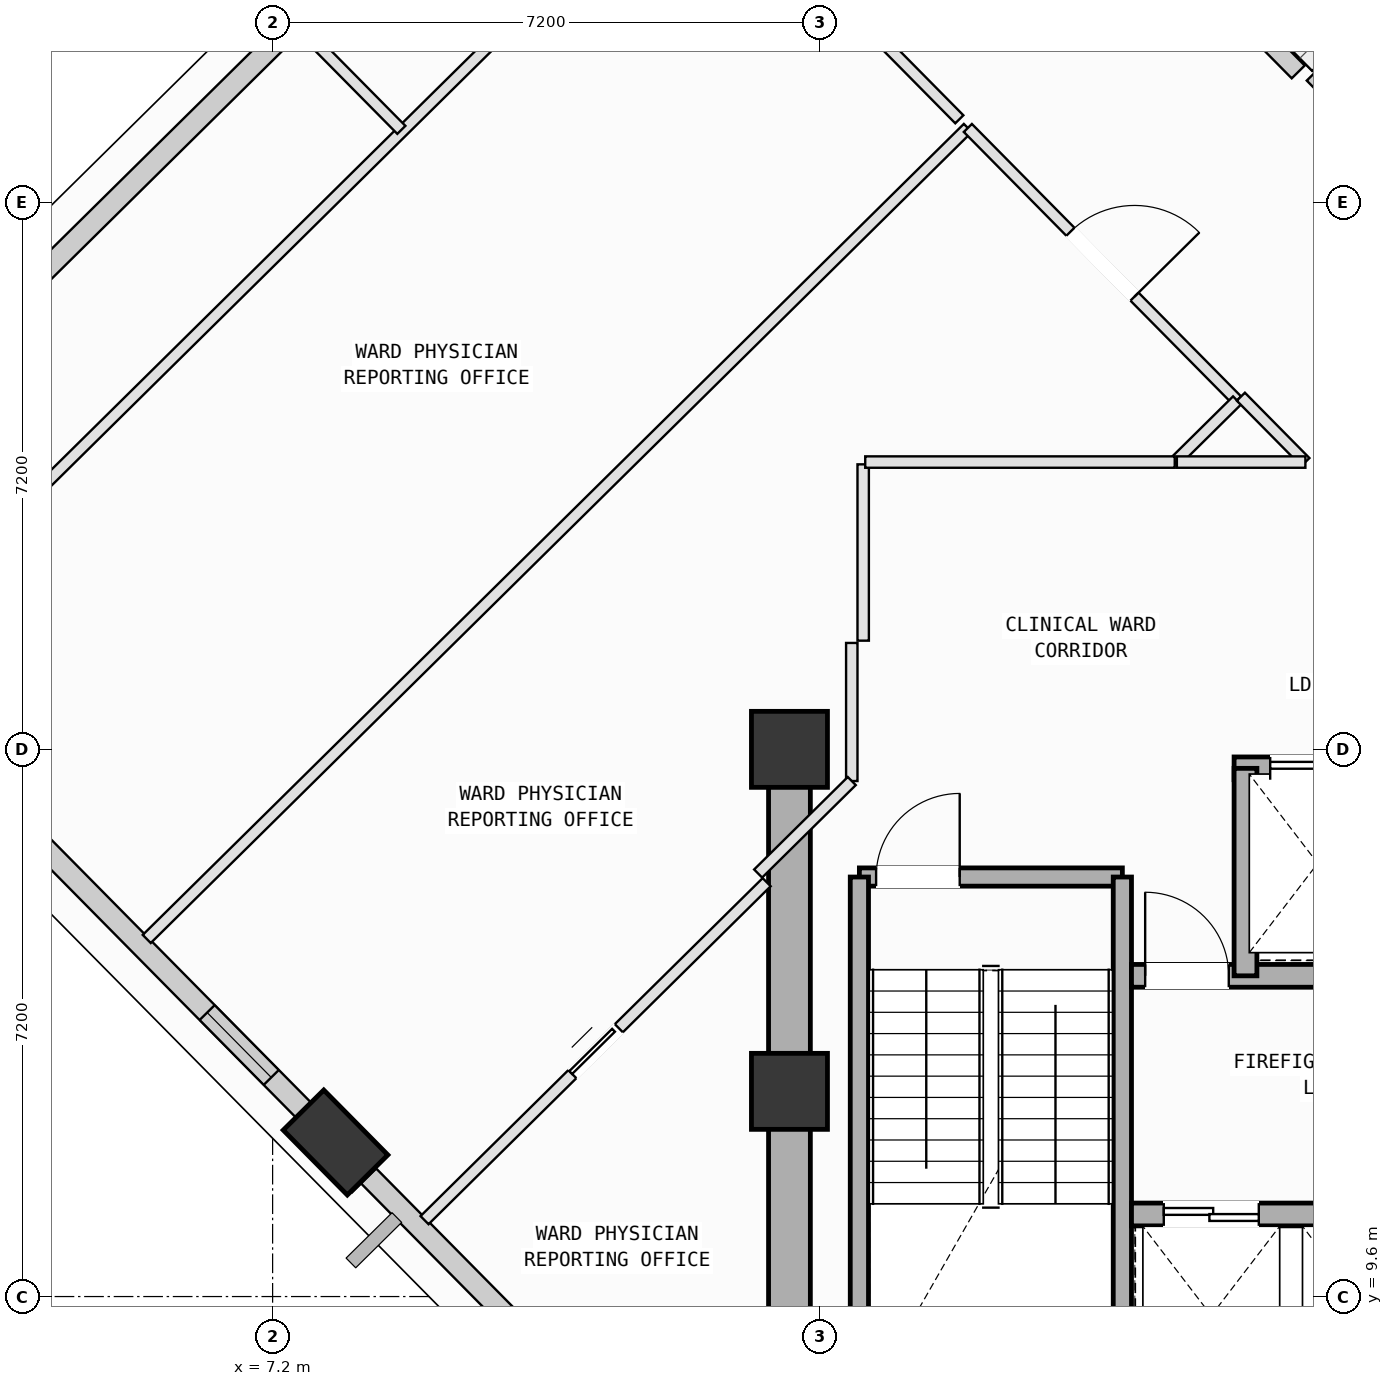
"""IFC4 building model, lengths in metres.
Left out: names, types, materials, properties, quantities, classifications, styles, units other than length and angle.
Written with IfcOpenShell. Run it as: python <this file> out.ifc"""

import sys

from ifc_helpers import new_model, si_unit, direction, frame, frame_2d, origin, origin_2d, place, context, subcontext, project, spatial, rectangle, extrude, element, fill, save


model = new_model("IFC4")
c1 = context("Model", 3, precision=1e-05, world=origin(), true_north=direction((0.0, 1.0)))
c2 = subcontext(c1, "Body", "Model", "MODEL_VIEW")
j1 = project(units=[si_unit("LENGTHUNIT", "METRE"), si_unit("PLANEANGLEUNIT", "RADIAN")], contexts=[c1])
p1 = place(None, origin())
s1 = spatial("IfcSite", under=j1, at=p1, CompositionType="ELEMENT")
p2 = place(p1, origin())
s2 = spatial("IfcBuilding", under=s1, at=p2, CompositionType="ELEMENT")
p3 = place(p2, frame((0.0, 0.0, 215.2)))
s3 = spatial("IfcBuildingStorey", under=s2, at=p3, CompositionType="ELEMENT", Elevation=215.2)
for number, where, z_axis, x_axis in (
    (1, (14.0, 12.3, 0.0), (0.0, 0.0, 1.0), (1.0, 0.0, 0.0)),
    (2, (14.0, 16.8, 0.0), (0.0, 0.0, 1.0), (1.0, 0.0, 0.0)),
):
    element("IfcColumn", number, at=place(p3, frame(where, z_axis=z_axis, x_axis=x_axis)), inside=s3, PredefinedType="COLUMN", context=c2, shape_type="SweptSolid", body=[
        extrude(rectangle(XDim=1.0, YDim=1.0, at=origin_2d()), origin(), (0.0, 0.0, 1.0), 4.0),
    ])
p4 = place(p3, frame((8.028, 11.627, 0.002), z_axis=(0.055080788667, -0.104762689458, 0.992970737543), x_axis=(-0.950778623185, 0.298211129608, 0.084202920807)))
e3 = element("IfcColumn", 3, at=p4, inside=s3, PredefinedType="COLUMN", context=c2, shape_type="SweptSolid", body=[
    extrude(rectangle(XDim=1.2, YDim=0.75, at=origin_2d()), origin(), (0.0, 0.0, 1.0), 4.025),
])
p5 = place(p3, frame((15.802, 30.665, 0.0), z_axis=(0.0, 0.0, 1.0), x_axis=(0.702761539953, -0.711425483071, 0.0)))
e4 = element("IfcWall", 4, at=p5, inside=s3, PredefinedType="SOLIDWALL", context=c2, shape_type="SweptSolid", body=[
    extrude(rectangle(XDim=6.96, YDim=0.24, at=frame_2d((3.48, 0.0))), origin(), (0.0, 0.0, 1.0), 3.265),
])
p6 = place(p5, frame((1.151, 0.0, 0.0)))
e5 = element("IfcOpeningElement", 5, at=p6, cuts=e4, PredefinedType="OPENING", context=c2, shape_type="SweptSolid", body=[
    extrude(rectangle(XDim=1.1, YDim=2.15, at=frame_2d((0.55, 1.075))), frame((0.0, 0.13, 0.0), z_axis=(0.0, -1.0, 0.0), x_axis=(1.0, 0.0, 0.0)), (0.0, 0.0, 1.0), 0.26),
])
p7 = place(p3, frame((20.89, 25.514, 0.0), z_axis=(0.0, 0.0, 1.0), x_axis=(0.71139038819, 0.702797065725, 0.0)))
e6 = element("IfcWall", 6, at=p7, inside=s3, PredefinedType="SOLIDWALL", context=c2, shape_type="SweptSolid", body=[
    extrude(rectangle(XDim=2.5, YDim=0.24, at=frame_2d((1.25, 0.0))), origin(), (0.0, 0.0, 1.0), 3.265),
])
p8 = place(p3, frame((2.666, 21.582, 0.0), z_axis=(0.0, 0.0, 1.0), x_axis=(0.711415560766, 0.702771584443, 0.0)))
e7 = element("IfcWall", 7, at=p8, inside=s3, PredefinedType="SOLIDWALL", context=c2, shape_type="SweptSolid", body=[
    extrude(rectangle(XDim=7.485, YDim=0.28, at=frame_2d((3.742, 0.0))), origin(), (0.0, 0.0, 1.0), 3.265),
])
p9 = place(p3, frame((7.913, 11.743, 0.0), z_axis=(0.0, 0.0, 1.0), x_axis=(-0.702759613108, 0.711427386445, 0.0)))
e8 = element("IfcWall", 8, at=p9, inside=s3, PredefinedType="SOLIDWALL", context=c2, shape_type="SweptSolid", body=[
    extrude(rectangle(XDim=5.831, YDim=0.28, at=frame_2d((2.915, 0.0))), origin(), (0.0, 0.0, 1.0), 3.265),
])
p10 = place(p9, frame((1.04, 0.0, 0.75)))
e9 = element("IfcOpeningElement", 9, at=p10, cuts=e8, PredefinedType="OPENING", context=c2, shape_type="SweptSolid", body=[
    extrude(rectangle(XDim=1.2, YDim=1.75, at=frame_2d((0.6, 0.875))), frame((0.0, 0.15, 0.0), z_axis=(0.0, -1.0, 0.0), x_axis=(1.0, 0.0, 0.0)), (0.0, 0.0, 1.0), 0.3),
])
p11 = place(p3, frame((12.582, 7.017, 0.0), z_axis=(0.0, 0.0, 1.0), x_axis=(-0.702761134533, 0.711425883554, 0.0)))
e10 = element("IfcWall", 10, at=p11, inside=s3, PredefinedType="SOLIDWALL", context=c2, shape_type="SweptSolid", body=[
    extrude(rectangle(XDim=5.861, YDim=0.28, at=frame_2d((2.93, 0.0))), origin(), (0.0, 0.0, 1.0), 3.265),
])
p12 = place(p11, frame((1.56, 0.0, 0.75)))
e11 = element("IfcOpeningElement", 11, at=p12, cuts=e10, PredefinedType="OPENING", context=c2, shape_type="SweptSolid", body=[
    extrude(rectangle(XDim=1.6, YDim=1.95, at=frame_2d((0.8, 0.975))), frame((0.0, 0.15, 0.0), z_axis=(0.0, -1.0, 0.0), x_axis=(1.0, 0.0, 0.0)), (0.0, 0.0, 1.0), 0.3),
])
p13 = place(p3, frame((14.92, 15.12, 0.0), z_axis=(0.0, 0.0, 1.0), x_axis=(1.0, 0.0, 0.0)))
e12 = element("IfcWall", 12, at=p13, inside=s3, PredefinedType="SOLIDWALL", context=c2, shape_type="SweptSolid", body=[
    extrude(rectangle(XDim=3.46, YDim=0.24, at=frame_2d((1.73, 0.0))), origin(), (0.0, 0.0, 1.0), 3.78),
])
p14 = place(p13, frame((0.22, 0.0, 0.0)))
e13 = element("IfcOpeningElement", 13, at=p14, cuts=e12, PredefinedType="OPENING", context=c2, shape_type="SweptSolid", body=[
    extrude(rectangle(XDim=1.1, YDim=2.15, at=frame_2d((0.55, 1.075))), frame((0.0, 0.13, 0.0), z_axis=(0.0, -1.0, 0.0), x_axis=(1.0, 0.0, 0.0)), (0.0, 0.0, 1.0), 0.26),
])
for number, where, z_axis, x_axis in (
    (14, (18.38, 15.12, 0.0), (0.0, 0.0, 1.0), (0.0, -1.0, 0.0)),
    (15, (14.92, 8.075, 0.0), (0.0, 0.0, 1.0), (0.0, 1.0, 0.0)),
):
    element("IfcWall", number, at=place(p3, frame(where, z_axis=z_axis, x_axis=x_axis)), inside=s3, PredefinedType="SOLIDWALL", context=c2, shape_type="SweptSolid", body=[
        extrude(rectangle(XDim=7.045, YDim=0.24, at=frame_2d((3.522, 0.0))), origin(), (0.0, 0.0, 1.0), 3.78),
    ])
p15 = place(p3, frame((14.0, 16.8, 0.0), z_axis=(0.0, 0.0, 1.0), x_axis=(0.0, -1.0, 0.0)))
e16 = element("IfcWall", 16, at=p15, inside=s3, PredefinedType="SHEAR", context=c2, shape_type="SweptSolid", body=[
    extrude(rectangle(XDim=9.0, YDim=0.55, at=frame_2d((4.5, 0.0))), origin(), (0.0, 0.0, 1.0), 3.78),
])
p16 = place(p3, frame((19.85, 16.55, 0.0), z_axis=(0.0, 0.0, 1.0), x_axis=(1.0, 0.0, 0.0)))
e17 = element("IfcWall", 17, at=p16, inside=s3, PredefinedType="SOLIDWALL", context=c2, shape_type="SweptSolid", body=[
    extrude(rectangle(XDim=4.45, YDim=0.3, at=frame_2d((2.225, 0.0))), origin(), (0.0, 0.0, 1.0), 3.78),
])
p17 = place(p16, frame((0.475, 0.0, 0.0)))
e18 = element("IfcOpeningElement", 18, at=p17, cuts=e17, PredefinedType="OPENING", context=c2, shape_type="SweptSolid", body=[
    extrude(rectangle(XDim=1.25, YDim=2.18, at=frame_2d((0.625, 1.09))), frame((0.0, 0.16, 0.0), z_axis=(0.0, -1.0, 0.0), x_axis=(1.0, 0.0, 0.0)), (0.0, 0.0, 1.0), 0.32),
])
p18 = place(p16, frame((2.49, 0.0, 0.0)))
e19 = element("IfcOpeningElement", 19, at=p18, cuts=e17, PredefinedType="OPENING", context=c2, shape_type="SweptSolid", body=[
    extrude(rectangle(XDim=1.02, YDim=2.12, at=frame_2d((0.51, 1.06))), frame((0.0, 0.16, 0.0), z_axis=(0.0, -1.0, 0.0), x_axis=(1.0, 0.0, 0.0)), (0.0, 0.0, 1.0), 0.32),
])
p19 = place(p3, frame((18.5, 10.68, 0.0), z_axis=(0.0, 0.0, 1.0), x_axis=(1.0, 0.0, 0.0)))
e20 = element("IfcWall", 20, at=p19, inside=s3, PredefinedType="SOLIDWALL", context=c2, shape_type="SweptSolid", body=[
    extrude(rectangle(XDim=5.3, YDim=0.3, at=frame_2d((2.65, 0.0))), origin(), (0.0, 0.0, 1.0), 3.78),
])
p20 = place(p19, frame((4.22, 0.0, 0.0)))
e21 = element("IfcOpeningElement", 21, at=p20, cuts=e20, PredefinedType="OPENING", context=c2, shape_type="SweptSolid", body=[
    extrude(rectangle(XDim=0.86, YDim=2.06, at=frame_2d((0.43, 1.03))), frame((0.0, 0.16, 0.0), z_axis=(0.0, -1.0, 0.0), x_axis=(1.0, 0.0, 0.0)), (0.0, 0.0, 1.0), 0.32),
])
p21 = place(p19, frame((0.425, 0.0, 0.0)))
e22 = element("IfcOpeningElement", 22, at=p21, cuts=e20, PredefinedType="OPENING", context=c2, shape_type="SweptSolid", body=[
    extrude(rectangle(XDim=1.25, YDim=2.18, at=frame_2d((0.625, 1.09))), frame((0.0, 0.16, 0.0), z_axis=(0.0, -1.0, 0.0), x_axis=(1.0, 0.0, 0.0)), (0.0, 0.0, 1.0), 0.32),
])
p22 = place(p19, frame((2.525, 0.0, 0.0)))
e23 = element("IfcOpeningElement", 23, at=p22, cuts=e20, PredefinedType="OPENING", context=c2, shape_type="SweptSolid", body=[
    extrude(rectangle(XDim=1.25, YDim=2.18, at=frame_2d((0.625, 1.09))), frame((0.0, 0.16, 0.0), z_axis=(0.0, -1.0, 0.0), x_axis=(1.0, 0.0, 0.0)), (0.0, 0.0, 1.0), 0.32),
])
p23 = place(p3, frame((18.5, 13.82, 0.0), z_axis=(0.0, 0.0, 1.0), x_axis=(1.0, 0.0, 0.0)))
e24 = element("IfcWall", 24, at=p23, inside=s3, PredefinedType="SOLIDWALL", context=c2, shape_type="SweptSolid", body=[
    extrude(rectangle(XDim=5.3, YDim=0.3, at=frame_2d((2.65, 0.0))), origin(), (0.0, 0.0, 1.0), 3.78),
])
p24 = place(p23, frame((0.18, 0.0, 0.0)))
e25 = element("IfcOpeningElement", 25, at=p24, cuts=e24, PredefinedType="OPENING", context=c2, shape_type="SweptSolid", body=[
    extrude(rectangle(XDim=1.1, YDim=2.15, at=frame_2d((0.55, 1.075))), frame((0.0, 0.16, 0.0), z_axis=(0.0, -1.0, 0.0), x_axis=(1.0, 0.0, 0.0)), (0.0, 0.0, 1.0), 0.32),
])
p25 = place(p3, frame((20.0, 13.82, 0.0), z_axis=(0.0, 0.0, 1.0), x_axis=(0.0, 1.0, 0.0)))
e26 = element("IfcWall", 26, at=p25, inside=s3, PredefinedType="SOLIDWALL", context=c2, shape_type="SweptSolid", body=[
    extrude(rectangle(XDim=2.73, YDim=0.3, at=frame_2d((1.365, 0.0))), origin(), (0.0, 0.0, 1.0), 3.78),
])
p26 = place(p3, frame((9.199, 10.605, 0.0), z_axis=(0.0, 0.0, 1.0), x_axis=(0.71135759635, 0.702830256971, 0.0)))
e27 = element("IfcWall", 27, at=p26, inside=s3, PredefinedType="PARTITIONING", context=c2, shape_type="SweptSolid", body=[
    extrude(rectangle(XDim=6.327, YDim=0.15, at=frame_2d((3.164, 0.0))), origin(), (0.0, 0.0, 1.0), 3.78),
])
p27 = place(p26, frame((2.734, 0.0, 0.0)))
e28 = element("IfcOpeningElement", 28, at=p27, cuts=e27, PredefinedType="OPENING", context=c2, shape_type="SweptSolid", body=[
    extrude(rectangle(XDim=0.86, YDim=2.06, at=frame_2d((0.43, 1.03))), frame((0.0, 0.085, 0.0), z_axis=(0.0, -1.0, 0.0), x_axis=(1.0, 0.0, 0.0)), (0.0, 0.0, 1.0), 0.17),
])
p28 = place(p3, frame((14.97, 20.55, 0.0), z_axis=(0.0, 0.0, 1.0), x_axis=(0.0, -1.0, 0.0)))
e29 = element("IfcWall", 29, at=p28, inside=s3, PredefinedType="PARTITIONING", context=c2, shape_type="SweptSolid", body=[
    extrude(rectangle(XDim=2.32, YDim=0.15, at=frame_2d((1.16, 0.0))), origin(), (0.0, 0.0, 1.0), 3.78),
])
p29 = place(p3, frame((14.82, 18.2, 0.0), z_axis=(0.0, 0.0, 1.0), x_axis=(0.0, -1.0, 0.0)))
e30 = element("IfcWall", 30, at=p29, inside=s3, PredefinedType="PARTITIONING", context=c2, shape_type="SweptSolid", body=[
    extrude(rectangle(XDim=1.817, YDim=0.15, at=frame_2d((0.908, 0.0))), origin(), (0.0, 0.0, 1.0), 3.78),
])
p30 = place(p3, frame((14.82, 16.383, 0.0), z_axis=(0.0, 0.0, 1.0), x_axis=(-0.711463271884, -0.702723283206, 0.0)))
e31 = element("IfcWall", 31, at=p30, inside=s3, PredefinedType="PARTITIONING", context=c2, shape_type="SweptSolid", body=[
    extrude(rectangle(XDim=1.732, YDim=0.15, at=frame_2d((0.866, 0.0))), origin(), (0.0, 0.0, 1.0), 3.78),
])
p31 = place(p3, frame((8.299, 11.024, 0.0), z_axis=(0.0, 0.0, 1.0), x_axis=(-0.702570675203, 0.711613972842, 0.0)))
e32 = element("IfcWall", 32, at=p31, inside=s3, PredefinedType="PARTITIONING", context=c2, shape_type="SweptSolid", body=[
    extrude(rectangle(XDim=0.783, YDim=0.15, at=frame_2d((0.392, 0.0))), origin(), (0.0, 0.0, 1.0), 3.265),
])
p32 = place(p3, frame((5.544, 14.305, 0.0), z_axis=(0.0, 0.0, 1.0), x_axis=(0.711434510245, 0.702752401371, 0.0)))
e33 = element("IfcWall", 33, at=p32, inside=s3, PredefinedType="PARTITIONING", context=c2, shape_type="SweptSolid", body=[
    extrude(rectangle(XDim=15.185, YDim=0.15, at=frame_2d((7.592, 0.0))), origin(), (0.0, 0.0, 1.0), 3.78),
])
p33 = place(p3, frame((16.347, 24.976, 0.0), z_axis=(0.0, 0.0, 1.0), x_axis=(0.702830826081, -0.711357034062, 0.0)))
e34 = element("IfcWall", 34, at=p33, inside=s3, PredefinedType="PARTITIONING", context=c2, shape_type="SweptSolid", body=[
    extrude(rectangle(XDim=5.04, YDim=0.15, at=frame_2d((2.52, 0.0))), origin(), (0.0, 0.0, 1.0), 3.78),
])
p34 = place(p33, frame((1.92, 0.0, 0.0)))
e35 = element("IfcOpeningElement", 35, at=p34, cuts=e34, PredefinedType="OPENING", context=c2, shape_type="SweptSolid", body=[
    extrude(rectangle(XDim=1.2, YDim=2.15, at=frame_2d((0.6, 1.075))), frame((0.0, 0.085, 0.0), z_axis=(0.0, -1.0, 0.0), x_axis=(1.0, 0.0, 0.0)), (0.0, 0.0, 1.0), 0.17),
])
p35 = place(p3, frame((19.889, 21.391, 0.0), z_axis=(0.0, 0.0, 1.0), x_axis=(-0.710907212679, -0.703285813138, 0.0)))
e36 = element("IfcWall", 36, at=p35, inside=s3, PredefinedType="PARTITIONING", context=c2, shape_type="SweptSolid", body=[
    extrude(rectangle(XDim=1.153, YDim=0.15, at=frame_2d((0.577, 0.0))), origin(), (0.0, 0.0, 1.0), 3.78),
])
p36 = place(p3, frame((19.069, 20.58, 0.0), z_axis=(0.0, 0.0, 1.0), x_axis=(-1.0, 0.0, 0.0)))
e37 = element("IfcWall", 37, at=p36, inside=s3, PredefinedType="PARTITIONING", context=c2, shape_type="SweptSolid", body=[
    extrude(rectangle(XDim=4.072, YDim=0.15, at=frame_2d((2.036, 0.0))), origin(), (0.0, 0.0, 1.0), 3.78),
])
p37 = place(p3, frame((3.038, 19.138, 0.0), z_axis=(0.0, 0.0, 1.0), x_axis=(0.71143794273, 0.702748926462, 0.0)))
e38 = element("IfcWall", 38, at=p37, inside=s3, PredefinedType="PARTITIONING", context=c2, shape_type="SweptSolid", body=[
    extrude(rectangle(XDim=13.571, YDim=0.15, at=frame_2d((6.786, 0.0))), origin(), (0.0, 0.0, 1.0), 3.78),
])
p38 = place(p3, frame((12.693, 28.675, 0.0), z_axis=(0.0, 0.0, 1.0), x_axis=(0.702830826081, -0.711357034062, 0.0)))
e39 = element("IfcWall", 39, at=p38, inside=s3, PredefinedType="PARTITIONING", context=c2, shape_type="SweptSolid", body=[
    extrude(rectangle(XDim=5.04, YDim=0.15, at=frame_2d((2.52, 0.0))), origin(), (0.0, 0.0, 1.0), 3.78),
])
p39 = place(p38, frame((1.92, 0.0, 0.0)))
e40 = element("IfcOpeningElement", 40, at=p39, cuts=e39, PredefinedType="OPENING", context=c2, shape_type="SweptSolid", body=[
    extrude(rectangle(XDim=1.2, YDim=2.15, at=frame_2d((0.6, 1.075))), frame((0.0, 0.085, 0.0), z_axis=(0.0, -1.0, 0.0), x_axis=(1.0, 0.0, 0.0)), (0.0, 0.0, 1.0), 0.17),
])
p40 = place(p3, frame((19.939, 21.44, 0.0), z_axis=(0.0, 0.0, 1.0), x_axis=(0.70264822924, -0.711537396028, 0.0)))
e41 = element("IfcWall", 41, at=p40, inside=s3, PredefinedType="PARTITIONING", context=c2, shape_type="SweptSolid", body=[
    extrude(rectangle(XDim=1.208, YDim=0.15, at=frame_2d((0.604, 0.0))), origin(), (0.0, 0.0, 1.0), 3.78),
])
p41 = place(p3, frame((20.788, 20.58, 0.0), z_axis=(0.0, 0.0, 1.0), x_axis=(-1.0, 0.0, 0.0)))
e42 = element("IfcWall", 42, at=p41, inside=s3, PredefinedType="PARTITIONING", context=c2, shape_type="SweptSolid", body=[
    extrude(rectangle(XDim=1.691, YDim=0.15, at=frame_2d((0.846, 0.0))), origin(), (0.0, 0.0, 1.0), 3.78),
])
p42 = place(p3, frame((8.894, 24.951, 0.0), z_axis=(0.0, 0.0, 1.0), x_axis=(-0.703036635776, 0.711153632316, 0.0)))
e43 = element("IfcWall", 43, at=p42, inside=s3, PredefinedType="PARTITIONING", context=c2, shape_type="SweptSolid", body=[
    extrude(rectangle(XDim=1.865, YDim=0.15, at=frame_2d((0.932, 0.0))), origin(), (0.0, 0.0, 1.0), 3.78),
])
p43 = place(p10, origin())
e44 = element("IfcWindow", 44, at=p43, inside=s3, PartitioningType="SINGLE_PANEL", PredefinedType="WINDOW", context=c2, shape_type="SweptSolid", body=[
    extrude(rectangle(XDim=1.2, YDim=1.75, at=frame_2d((0.6, 0.875))), frame((0.0, 0.03, 0.0), z_axis=(0.0, -1.0, 0.0), x_axis=(1.0, 0.0, 0.0)), (0.0, 0.0, 1.0), 0.06),
])
fill(e9, e44)
p44 = place(p14, origin())
e45 = element("IfcDoor", 45, at=p44, inside=s3, OperationType="SINGLE_SWING_RIGHT", PredefinedType="DOOR", context=c2, shape_type="SweptSolid", body=[
    extrude(rectangle(XDim=1.1, YDim=2.15, at=frame_2d((0.55, 1.075))), frame((0.0, 0.025, 0.0), z_axis=(0.0, -1.0, 0.0), x_axis=(1.0, 0.0, 0.0)), (0.0, 0.0, 1.0), 0.05),
])
fill(e13, e45)
p45 = place(p24, origin())
e46 = element("IfcDoor", 46, at=p45, inside=s3, OperationType="SINGLE_SWING_LEFT", PredefinedType="DOOR", context=c2, shape_type="SweptSolid", body=[
    extrude(rectangle(XDim=1.1, YDim=2.15, at=frame_2d((0.55, 1.075))), frame((0.0, 0.025, 0.0), z_axis=(0.0, -1.0, 0.0), x_axis=(1.0, 0.0, 0.0)), (0.0, 0.0, 1.0), 0.05),
])
fill(e25, e46)
p46 = place(p21, origin())
e47 = element("IfcDoor", 47, at=p46, inside=s3, OperationType="DOUBLE_DOOR_SLIDING", PredefinedType="DOOR", context=c2, shape_type="SweptSolid", body=[
    extrude(rectangle(XDim=1.25, YDim=2.18, at=frame_2d((0.625, 1.09))), frame((0.0, 0.025, 0.0), z_axis=(0.0, -1.0, 0.0), x_axis=(1.0, 0.0, 0.0)), (0.0, 0.0, 1.0), 0.05),
])
fill(e22, e47)
p47 = place(p17, origin())
e48 = element("IfcDoor", 48, at=p47, inside=s3, OperationType="DOUBLE_DOOR_SLIDING", PredefinedType="DOOR", context=c2, shape_type="SweptSolid", body=[
    extrude(rectangle(XDim=1.25, YDim=2.18, at=frame_2d((0.625, 1.09))), frame((0.0, 0.025, 0.0), z_axis=(0.0, -1.0, 0.0), x_axis=(1.0, 0.0, 0.0)), (0.0, 0.0, 1.0), 0.05),
])
fill(e18, e48)
p48 = place(p34, origin())
e49 = element("IfcDoor", 49, at=p48, inside=s3, OperationType="SINGLE_SWING_RIGHT", PredefinedType="DOOR", context=c2, shape_type="SweptSolid", body=[
    extrude(rectangle(XDim=1.2, YDim=2.15, at=frame_2d((0.6, 1.075))), frame((0.0, 0.025, 0.0), z_axis=(0.0, -1.0, 0.0), x_axis=(1.0, 0.0, 0.0)), (0.0, 0.0, 1.0), 0.05),
])
fill(e35, e49)
p49 = place(p27, origin())
e50 = element("IfcDoor", 50, at=p49, inside=s3, OperationType="SLIDING_TO_LEFT", PredefinedType="DOOR", context=c2, shape_type="SweptSolid", body=[
    extrude(rectangle(XDim=0.86, YDim=2.06, at=frame_2d((0.43, 1.03))), frame((0.0, 0.025, 0.0), z_axis=(0.0, -1.0, 0.0), x_axis=(1.0, 0.0, 0.0)), (0.0, 0.0, 1.0), 0.05),
])
fill(e28, e50)
save(model, sys.argv[1])
